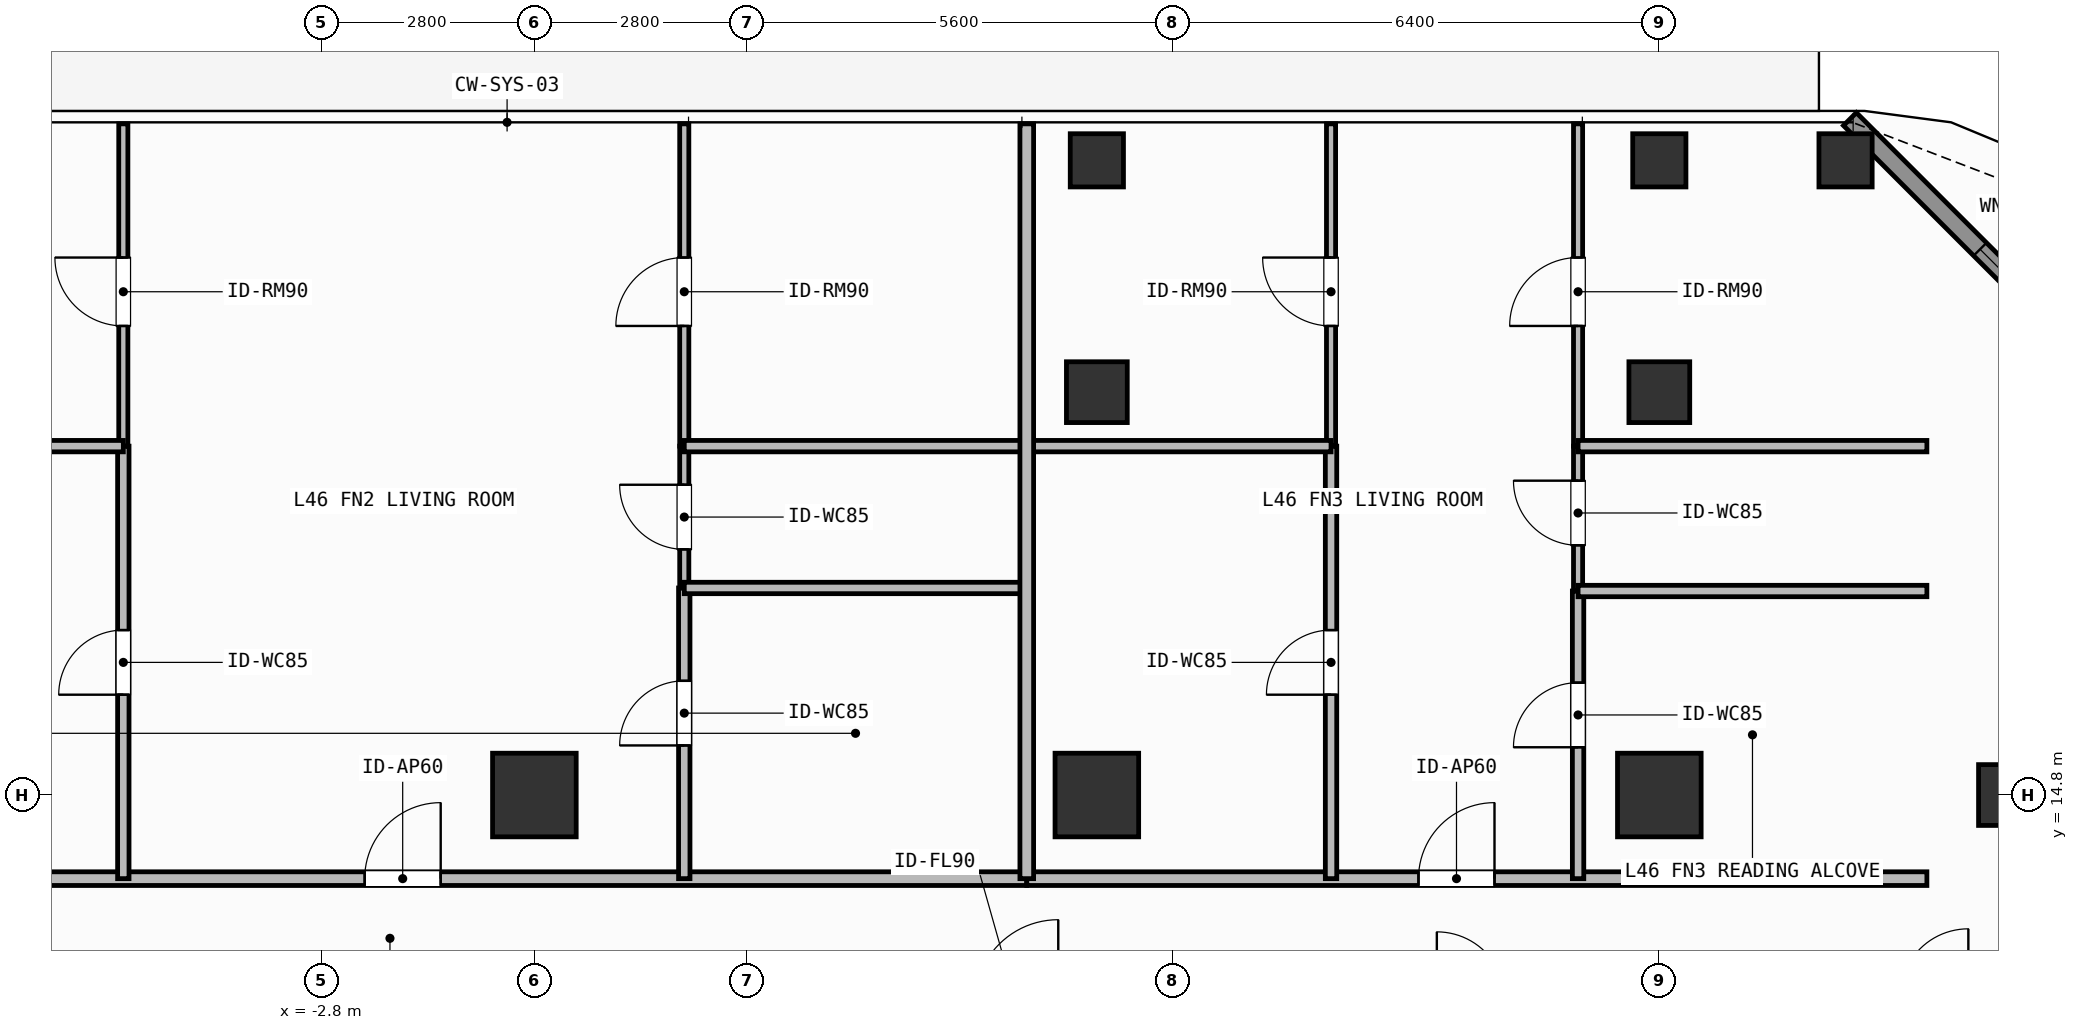
"""IFC4 building model, lengths in metres.
Left out: names, types, materials, properties, quantities, classifications, styles, units other than length and angle.
Written with IfcOpenShell. Run it as: python <this file> out.ifc"""

import sys

from ifc_helpers import new_model, si_unit, direction, frame, frame_2d, origin, origin_2d, place, context, subcontext, project, spatial, rectangle, hollow_rectangle, extrude, element, fill, save


model = new_model("IFC4")
c1 = context("Model", 3, precision=1e-05, world=origin(), true_north=direction((0.0, 1.0)))
c2 = subcontext(c1, "Body", "Model", "MODEL_VIEW")
j1 = project(units=[si_unit("LENGTHUNIT", "METRE"), si_unit("PLANEANGLEUNIT", "RADIAN")], contexts=[c1])
p1 = place(None, origin())
s1 = spatial("IfcSite", under=j1, at=p1, CompositionType="ELEMENT")
p2 = place(p1, origin())
s2 = spatial("IfcBuilding", under=s1, at=p2, CompositionType="ELEMENT")
p3 = place(p2, frame((0.0, 0.0, 187.5)))
s3 = spatial("IfcBuildingStorey", under=s2, at=p3, CompositionType="ELEMENT", Elevation=187.5)
for number, where, z_axis, x_axis in (
    (1, (0.0, 14.8, 0.0), (0.0, 0.0, 1.0), (1.0, 0.0, 0.0)),
    (2, (7.4, 14.8, 0.0), (0.0, 0.0, 1.0), (1.0, 0.0, 0.0)),
    (3, (14.8, 14.8, 0.0), (0.0, 0.0, 1.0), (1.0, 0.0, 0.0)),
):
    element("IfcColumn", number, at=place(p3, frame(where, z_axis=z_axis, x_axis=x_axis)), inside=s3, PredefinedType="COLUMN", context=c2, shape_type="SweptSolid", body=[
        extrude(rectangle(XDim=1.1, YDim=1.1, at=origin_2d()), origin(), (0.0, 0.0, 1.0), 3.9),
    ])
for number, where, z_axis, x_axis in (
    (4, (19.4, 14.8, 0.0), (0.0, 0.0, 1.0), (1.0, 0.0, 0.0)),
    (5, (7.4, 20.1, 0.0), (0.0, 0.0, 1.0), (1.0, 0.0, 0.0)),
    (6, (14.8, 20.1, 0.0), (0.0, 0.0, 1.0), (1.0, 0.0, 0.0)),
):
    element("IfcColumn", number, at=place(p3, frame(where, z_axis=z_axis, x_axis=x_axis)), inside=s3, PredefinedType="COLUMN", context=c2, shape_type="SweptSolid", body=[
        extrude(hollow_rectangle(XDim=0.8, YDim=0.8, WallThickness=0.036, at=origin_2d()), origin(), (0.0, 0.0, 1.0), 3.9),
    ])
for number, where, z_axis, x_axis in (
    (7, (17.25, 23.15, 0.0), (0.0, 0.0, 1.0), (1.0, 0.0, 0.0)),
    (8, (7.4, 23.15, 0.0), (0.0, 0.0, 1.0), (1.0, 0.0, 0.0)),
    (9, (14.8, 23.15, 0.0), (0.0, 0.0, 1.0), (1.0, 0.0, 0.0)),
):
    element("IfcColumn", number, at=place(p3, frame(where, z_axis=z_axis, x_axis=x_axis)), inside=s3, PredefinedType="COLUMN", context=c2, shape_type="SweptSolid", body=[
        extrude(hollow_rectangle(XDim=0.7, YDim=0.7, WallThickness=0.032, at=origin_2d()), origin(), (0.0, 0.0, 1.0), 3.9),
    ])
p4 = place(p3, frame((17.308, 23.692, 0.0), z_axis=(0.0, 0.0, 1.0), x_axis=(0.707106781187, -0.707106781187, 0.0)))
e10 = element("IfcWall", 10, at=p4, inside=s3, PredefinedType="SOLIDWALL", context=c2, shape_type="SweptSolid", body=[
    extrude(rectangle(XDim=6.343, YDim=0.24, at=frame_2d((3.171, 0.0))), origin(), (0.0, 0.0, 1.0), 3.62),
])
p5 = place(p4, frame((2.421, 0.0, 0.8)))
e11 = element("IfcOpeningElement", 11, at=p5, cuts=e10, PredefinedType="OPENING", context=c2, shape_type="SweptSolid", body=[
    extrude(rectangle(XDim=1.5, YDim=1.85, at=frame_2d((0.75, 0.925))), frame((0.0, 0.13, 0.0), z_axis=(0.0, -1.0, 0.0), x_axis=(1.0, 0.0, 0.0)), (0.0, 0.0, 1.0), 0.26),
])
p6 = place(p3, frame((-12.28, 13.7, 0.0), z_axis=(0.0, 0.0, 1.0), x_axis=(1.0, 0.0, 0.0)))
e12 = element("IfcWall", 12, at=p6, inside=s3, PredefinedType="PARTITIONING", context=c2, shape_type="SweptSolid", body=[
    extrude(rectangle(XDim=18.758, YDim=0.18, at=frame_2d((9.379, 0.0))), origin(), (0.0, 0.0, 1.0), 3.62),
])
p7 = place(p6, frame((10.048, 0.0, 0.0)))
e13 = element("IfcOpeningElement", 13, at=p7, cuts=e12, PredefinedType="OPENING", context=c2, shape_type="SweptSolid", body=[
    extrude(rectangle(XDim=1.0, YDim=2.2, at=frame_2d((0.5, 1.1))), frame((0.0, 0.1, 0.0), z_axis=(0.0, -1.0, 0.0), x_axis=(1.0, 0.0, 0.0)), (0.0, 0.0, 1.0), 0.2),
])
p8 = place(p3, frame((-5.408, 13.7, 0.0), z_axis=(0.0, 0.0, 1.0), x_axis=(0.0, 1.0, 0.0)))
e14 = element("IfcWall", 14, at=p8, inside=s3, PredefinedType="PARTITIONING", context=c2, shape_type="SweptSolid", body=[
    extrude(rectangle(XDim=5.69, YDim=0.15, at=frame_2d((2.845, 0.0))), origin(), (0.0, 0.0, 1.0), 3.62),
])
p9 = place(p8, frame((2.42, 0.0, 0.0)))
e15 = element("IfcOpeningElement", 15, at=p9, cuts=e14, PredefinedType="OPENING", context=c2, shape_type="SweptSolid", body=[
    extrude(rectangle(XDim=0.85, YDim=2.1, at=frame_2d((0.425, 1.05))), frame((0.0, 0.085, 0.0), z_axis=(0.0, -1.0, 0.0), x_axis=(1.0, 0.0, 0.0)), (0.0, 0.0, 1.0), 0.17),
])
p10 = place(p3, frame((-5.408, 19.39, 0.0), z_axis=(0.0, 0.0, 1.0), x_axis=(0.0, 1.0, 0.0)))
e16 = element("IfcWall", 16, at=p10, inside=s3, PredefinedType="PARTITIONING", context=c2, shape_type="SweptSolid", body=[
    extrude(rectangle(XDim=4.24, YDim=0.12, at=frame_2d((2.12, 0.0))), origin(), (0.0, 0.0, 1.0), 3.62),
])
p11 = place(p10, frame((1.581, 0.0, 0.0)))
e17 = element("IfcOpeningElement", 17, at=p11, cuts=e16, PredefinedType="OPENING", context=c2, shape_type="SweptSolid", body=[
    extrude(rectangle(XDim=0.9, YDim=2.1, at=frame_2d((0.45, 1.05))), frame((0.0, 0.07, 0.0), z_axis=(0.0, -1.0, 0.0), x_axis=(1.0, 0.0, 0.0)), (0.0, 0.0, 1.0), 0.14),
])
p12 = place(p3, frame((1.972, 13.7, 0.0), z_axis=(0.0, 0.0, 1.0), x_axis=(0.0, 1.0, 0.0)))
e18 = element("IfcWall", 18, at=p12, inside=s3, PredefinedType="PARTITIONING", context=c2, shape_type="SweptSolid", body=[
    extrude(rectangle(XDim=3.824, YDim=0.15, at=frame_2d((1.912, 0.0))), origin(), (0.0, 0.0, 1.0), 3.62),
])
p13 = place(p12, frame((1.752, 0.0, 0.0)))
e19 = element("IfcOpeningElement", 19, at=p13, cuts=e18, PredefinedType="OPENING", context=c2, shape_type="SweptSolid", body=[
    extrude(rectangle(XDim=0.85, YDim=2.1, at=frame_2d((0.425, 1.05))), frame((0.0, 0.085, 0.0), z_axis=(0.0, -1.0, 0.0), x_axis=(1.0, 0.0, 0.0)), (0.0, 0.0, 1.0), 0.17),
])
p14 = place(p3, frame((1.972, 17.524, 0.0), z_axis=(0.0, 0.0, 1.0), x_axis=(0.0, 1.0, 0.0)))
e20 = element("IfcWall", 20, at=p14, inside=s3, PredefinedType="PARTITIONING", context=c2, shape_type="SweptSolid", body=[
    extrude(rectangle(XDim=1.866, YDim=0.12, at=frame_2d((0.933, 0.0))), origin(), (0.0, 0.0, 1.0), 3.62),
])
p15 = place(p14, frame((0.508, 0.0, 0.0)))
e21 = element("IfcOpeningElement", 21, at=p15, cuts=e20, PredefinedType="OPENING", context=c2, shape_type="SweptSolid", body=[
    extrude(rectangle(XDim=0.85, YDim=2.1, at=frame_2d((0.425, 1.05))), frame((0.0, 0.07, 0.0), z_axis=(0.0, -1.0, 0.0), x_axis=(1.0, 0.0, 0.0)), (0.0, 0.0, 1.0), 0.14),
])
p16 = place(p3, frame((1.972, 19.39, 0.0), z_axis=(0.0, 0.0, 1.0), x_axis=(0.0, 1.0, 0.0)))
e22 = element("IfcWall", 22, at=p16, inside=s3, PredefinedType="PARTITIONING", context=c2, shape_type="SweptSolid", body=[
    extrude(rectangle(XDim=4.24, YDim=0.12, at=frame_2d((2.12, 0.0))), origin(), (0.0, 0.0, 1.0), 3.62),
])
p17 = place(p16, frame((1.581, 0.0, 0.0)))
e23 = element("IfcOpeningElement", 23, at=p17, cuts=e22, PredefinedType="OPENING", context=c2, shape_type="SweptSolid", body=[
    extrude(rectangle(XDim=0.9, YDim=2.1, at=frame_2d((0.45, 1.05))), frame((0.0, 0.07, 0.0), z_axis=(0.0, -1.0, 0.0), x_axis=(1.0, 0.0, 0.0)), (0.0, 0.0, 1.0), 0.14),
])
p18 = place(p3, frame((6.478, 13.7, 0.0), z_axis=(0.0, 0.0, 1.0), x_axis=(1.0, 0.0, 0.0)))
e24 = element("IfcWall", 24, at=p18, inside=s3, PredefinedType="PARTITIONING", context=c2, shape_type="SweptSolid", body=[
    extrude(rectangle(XDim=11.842, YDim=0.18, at=frame_2d((5.921, 0.0))), origin(), (0.0, 0.0, 1.0), 3.62),
])
p19 = place(p18, frame((5.154, 0.0, 0.0)))
e25 = element("IfcOpeningElement", 25, at=p19, cuts=e24, PredefinedType="OPENING", context=c2, shape_type="SweptSolid", body=[
    extrude(rectangle(XDim=1.0, YDim=2.2, at=frame_2d((0.5, 1.1))), frame((0.0, 0.1, 0.0), z_axis=(0.0, -1.0, 0.0), x_axis=(1.0, 0.0, 0.0)), (0.0, 0.0, 1.0), 0.2),
])
p20 = place(p3, frame((10.481, 13.7, 0.0), z_axis=(0.0, 0.0, 1.0), x_axis=(0.0, 1.0, 0.0)))
e26 = element("IfcWall", 26, at=p20, inside=s3, PredefinedType="PARTITIONING", context=c2, shape_type="SweptSolid", body=[
    extrude(rectangle(XDim=5.69, YDim=0.15, at=frame_2d((2.845, 0.0))), origin(), (0.0, 0.0, 1.0), 3.62),
])
p21 = place(p20, frame((2.42, 0.0, 0.0)))
e27 = element("IfcOpeningElement", 27, at=p21, cuts=e26, PredefinedType="OPENING", context=c2, shape_type="SweptSolid", body=[
    extrude(rectangle(XDim=0.85, YDim=2.1, at=frame_2d((0.425, 1.05))), frame((0.0, 0.085, 0.0), z_axis=(0.0, -1.0, 0.0), x_axis=(1.0, 0.0, 0.0)), (0.0, 0.0, 1.0), 0.17),
])
p22 = place(p3, frame((10.481, 19.39, 0.0), z_axis=(0.0, 0.0, 1.0), x_axis=(0.0, 1.0, 0.0)))
e28 = element("IfcWall", 28, at=p22, inside=s3, PredefinedType="PARTITIONING", context=c2, shape_type="SweptSolid", body=[
    extrude(rectangle(XDim=4.24, YDim=0.12, at=frame_2d((2.12, 0.0))), origin(), (0.0, 0.0, 1.0), 3.62),
])
p23 = place(p22, frame((1.581, 0.0, 0.0)))
e29 = element("IfcOpeningElement", 29, at=p23, cuts=e28, PredefinedType="OPENING", context=c2, shape_type="SweptSolid", body=[
    extrude(rectangle(XDim=0.9, YDim=2.1, at=frame_2d((0.45, 1.05))), frame((0.0, 0.07, 0.0), z_axis=(0.0, -1.0, 0.0), x_axis=(1.0, 0.0, 0.0)), (0.0, 0.0, 1.0), 0.14),
])
p24 = place(p3, frame((13.731, 13.7, 0.0), z_axis=(0.0, 0.0, 1.0), x_axis=(0.0, 1.0, 0.0)))
e30 = element("IfcWall", 30, at=p24, inside=s3, PredefinedType="PARTITIONING", context=c2, shape_type="SweptSolid", body=[
    extrude(rectangle(XDim=3.784, YDim=0.15, at=frame_2d((1.892, 0.0))), origin(), (0.0, 0.0, 1.0), 3.62),
])
p25 = place(p24, frame((1.729, 0.0, 0.0)))
e31 = element("IfcOpeningElement", 31, at=p25, cuts=e30, PredefinedType="OPENING", context=c2, shape_type="SweptSolid", body=[
    extrude(rectangle(XDim=0.85, YDim=2.1, at=frame_2d((0.425, 1.05))), frame((0.0, 0.085, 0.0), z_axis=(0.0, -1.0, 0.0), x_axis=(1.0, 0.0, 0.0)), (0.0, 0.0, 1.0), 0.17),
])
p26 = place(p3, frame((13.731, 17.484, 0.0), z_axis=(0.0, 0.0, 1.0), x_axis=(0.0, 1.0, 0.0)))
e32 = element("IfcWall", 32, at=p26, inside=s3, PredefinedType="PARTITIONING", context=c2, shape_type="SweptSolid", body=[
    extrude(rectangle(XDim=1.906, YDim=0.12, at=frame_2d((0.953, 0.0))), origin(), (0.0, 0.0, 1.0), 3.62),
])
p27 = place(p26, frame((0.602, 0.0, 0.0)))
e33 = element("IfcOpeningElement", 33, at=p27, cuts=e32, PredefinedType="OPENING", context=c2, shape_type="SweptSolid", body=[
    extrude(rectangle(XDim=0.85, YDim=2.1, at=frame_2d((0.425, 1.05))), frame((0.0, 0.07, 0.0), z_axis=(0.0, -1.0, 0.0), x_axis=(1.0, 0.0, 0.0)), (0.0, 0.0, 1.0), 0.14),
])
p28 = place(p3, frame((13.731, 19.39, 0.0), z_axis=(0.0, 0.0, 1.0), x_axis=(0.0, 1.0, 0.0)))
e34 = element("IfcWall", 34, at=p28, inside=s3, PredefinedType="PARTITIONING", context=c2, shape_type="SweptSolid", body=[
    extrude(rectangle(XDim=4.24, YDim=0.12, at=frame_2d((2.12, 0.0))), origin(), (0.0, 0.0, 1.0), 3.62),
])
p29 = place(p28, frame((1.581, 0.0, 0.0)))
e35 = element("IfcOpeningElement", 35, at=p29, cuts=e34, PredefinedType="OPENING", context=c2, shape_type="SweptSolid", body=[
    extrude(rectangle(XDim=0.9, YDim=2.1, at=frame_2d((0.45, 1.05))), frame((0.0, 0.07, 0.0), z_axis=(0.0, -1.0, 0.0), x_axis=(1.0, 0.0, 0.0)), (0.0, 0.0, 1.0), 0.14),
])
p30 = place(p3, frame((-12.28, 19.39, 0.0), z_axis=(0.0, 0.0, 1.0), x_axis=(1.0, 0.0, 0.0)))
e36 = element("IfcWall", 36, at=p30, inside=s3, PredefinedType="PARTITIONING", context=c2, shape_type="SweptSolid", body=[
    extrude(rectangle(XDim=6.872, YDim=0.15, at=frame_2d((3.436, 0.0))), origin(), (0.0, 0.0, 1.0), 3.62),
])
for number, where, z_axis, x_axis in (
    (37, (1.972, 17.524, 0.0), (0.0, 0.0, 1.0), (1.0, 0.0, 0.0)),
    (38, (1.972, 19.39, 0.0), (0.0, 0.0, 1.0), (1.0, 0.0, 0.0)),
):
    element("IfcWall", number, at=place(p3, frame(where, z_axis=z_axis, x_axis=x_axis)), inside=s3, PredefinedType="PARTITIONING", context=c2, shape_type="SweptSolid", body=[
        extrude(rectangle(XDim=4.506, YDim=0.15, at=frame_2d((2.253, 0.0))), origin(), (0.0, 0.0, 1.0), 3.62),
    ])
p31 = place(p3, frame((6.478, 19.39, 0.0), z_axis=(0.0, 0.0, 1.0), x_axis=(1.0, 0.0, 0.0)))
e39 = element("IfcWall", 39, at=p31, inside=s3, PredefinedType="PARTITIONING", context=c2, shape_type="SweptSolid", body=[
    extrude(rectangle(XDim=4.003, YDim=0.15, at=frame_2d((2.001, 0.0))), origin(), (0.0, 0.0, 1.0), 3.62),
])
for number, where, z_axis, x_axis in (
    (40, (13.731, 17.484, 0.0), (0.0, 0.0, 1.0), (1.0, 0.0, 0.0)),
    (41, (13.731, 19.39, 0.0), (0.0, 0.0, 1.0), (1.0, 0.0, 0.0)),
):
    element("IfcWall", number, at=place(p3, frame(where, z_axis=z_axis, x_axis=x_axis)), inside=s3, PredefinedType="PARTITIONING", context=c2, shape_type="SweptSolid", body=[
        extrude(rectangle(XDim=4.589, YDim=0.15, at=frame_2d((2.294, 0.0))), origin(), (0.0, 0.0, 1.0), 3.62),
    ])
p32 = place(p3, frame((6.478, 13.7, 0.0), z_axis=(0.0, 0.0, 1.0), x_axis=(0.0, 1.0, 0.0)))
e42 = element("IfcWall", 42, at=p32, inside=s3, PredefinedType="PARTITIONING", context=c2, shape_type="SweptSolid", body=[
    extrude(rectangle(XDim=9.93, YDim=0.18, at=frame_2d((4.965, 0.0))), origin(), (0.0, 0.0, 1.0), 3.62),
])
p33 = place(p5, origin())
e43 = element("IfcWindow", 43, at=p33, inside=s3, PartitioningType="SINGLE_PANEL", PredefinedType="WINDOW", context=c2, shape_type="SweptSolid", body=[
    extrude(rectangle(XDim=1.5, YDim=1.85, at=frame_2d((0.75, 0.925))), frame((0.0, 0.03, 0.0), z_axis=(0.0, -1.0, 0.0), x_axis=(1.0, 0.0, 0.0)), (0.0, 0.0, 1.0), 0.06),
])
fill(e11, e43)
p34 = place(p7, origin())
e44 = element("IfcDoor", 44, at=p34, inside=s3, OperationType="SINGLE_SWING_RIGHT", PredefinedType="DOOR", context=c2, shape_type="SweptSolid", body=[
    extrude(rectangle(XDim=1.0, YDim=2.2, at=frame_2d((0.5, 1.1))), frame((0.0, 0.025, 0.0), z_axis=(0.0, -1.0, 0.0), x_axis=(1.0, 0.0, 0.0)), (0.0, 0.0, 1.0), 0.05),
])
fill(e13, e44)
p35 = place(p9, origin())
e45 = element("IfcDoor", 45, at=p35, inside=s3, OperationType="SINGLE_SWING_LEFT", PredefinedType="DOOR", context=c2, shape_type="SweptSolid", body=[
    extrude(rectangle(XDim=0.85, YDim=2.1, at=frame_2d((0.425, 1.05))), frame((0.0, 0.025, 0.0), z_axis=(0.0, -1.0, 0.0), x_axis=(1.0, 0.0, 0.0)), (0.0, 0.0, 1.0), 0.05),
])
fill(e15, e45)
p36 = place(p11, origin())
e46 = element("IfcDoor", 46, at=p36, inside=s3, OperationType="SINGLE_SWING_RIGHT", PredefinedType="DOOR", context=c2, shape_type="SweptSolid", body=[
    extrude(rectangle(XDim=0.9, YDim=2.1, at=frame_2d((0.45, 1.05))), frame((0.0, 0.025, 0.0), z_axis=(0.0, -1.0, 0.0), x_axis=(1.0, 0.0, 0.0)), (0.0, 0.0, 1.0), 0.05),
])
fill(e17, e46)
p37 = place(p13, origin())
e47 = element("IfcDoor", 47, at=p37, inside=s3, OperationType="SINGLE_SWING_LEFT", PredefinedType="DOOR", context=c2, shape_type="SweptSolid", body=[
    extrude(rectangle(XDim=0.85, YDim=2.1, at=frame_2d((0.425, 1.05))), frame((0.0, 0.025, 0.0), z_axis=(0.0, -1.0, 0.0), x_axis=(1.0, 0.0, 0.0)), (0.0, 0.0, 1.0), 0.05),
])
fill(e19, e47)
p38 = place(p15, origin())
e48 = element("IfcDoor", 48, at=p38, inside=s3, OperationType="SINGLE_SWING_RIGHT", PredefinedType="DOOR", context=c2, shape_type="SweptSolid", body=[
    extrude(rectangle(XDim=0.85, YDim=2.1, at=frame_2d((0.425, 1.05))), frame((0.0, 0.025, 0.0), z_axis=(0.0, -1.0, 0.0), x_axis=(1.0, 0.0, 0.0)), (0.0, 0.0, 1.0), 0.05),
])
fill(e21, e48)
p39 = place(p17, origin())
e49 = element("IfcDoor", 49, at=p39, inside=s3, OperationType="SINGLE_SWING_LEFT", PredefinedType="DOOR", context=c2, shape_type="SweptSolid", body=[
    extrude(rectangle(XDim=0.9, YDim=2.1, at=frame_2d((0.45, 1.05))), frame((0.0, 0.025, 0.0), z_axis=(0.0, -1.0, 0.0), x_axis=(1.0, 0.0, 0.0)), (0.0, 0.0, 1.0), 0.05),
])
fill(e23, e49)
p40 = place(p19, origin())
e50 = element("IfcDoor", 50, at=p40, inside=s3, OperationType="SINGLE_SWING_RIGHT", PredefinedType="DOOR", context=c2, shape_type="SweptSolid", body=[
    extrude(rectangle(XDim=1.0, YDim=2.2, at=frame_2d((0.5, 1.1))), frame((0.0, 0.025, 0.0), z_axis=(0.0, -1.0, 0.0), x_axis=(1.0, 0.0, 0.0)), (0.0, 0.0, 1.0), 0.05),
])
fill(e25, e50)
p41 = place(p21, origin())
e51 = element("IfcDoor", 51, at=p41, inside=s3, OperationType="SINGLE_SWING_LEFT", PredefinedType="DOOR", context=c2, shape_type="SweptSolid", body=[
    extrude(rectangle(XDim=0.85, YDim=2.1, at=frame_2d((0.425, 1.05))), frame((0.0, 0.025, 0.0), z_axis=(0.0, -1.0, 0.0), x_axis=(1.0, 0.0, 0.0)), (0.0, 0.0, 1.0), 0.05),
])
fill(e27, e51)
p42 = place(p23, origin())
e52 = element("IfcDoor", 52, at=p42, inside=s3, OperationType="SINGLE_SWING_RIGHT", PredefinedType="DOOR", context=c2, shape_type="SweptSolid", body=[
    extrude(rectangle(XDim=0.9, YDim=2.1, at=frame_2d((0.45, 1.05))), frame((0.0, 0.025, 0.0), z_axis=(0.0, -1.0, 0.0), x_axis=(1.0, 0.0, 0.0)), (0.0, 0.0, 1.0), 0.05),
])
fill(e29, e52)
p43 = place(p25, origin())
e53 = element("IfcDoor", 53, at=p43, inside=s3, OperationType="SINGLE_SWING_LEFT", PredefinedType="DOOR", context=c2, shape_type="SweptSolid", body=[
    extrude(rectangle(XDim=0.85, YDim=2.1, at=frame_2d((0.425, 1.05))), frame((0.0, 0.025, 0.0), z_axis=(0.0, -1.0, 0.0), x_axis=(1.0, 0.0, 0.0)), (0.0, 0.0, 1.0), 0.05),
])
fill(e31, e53)
p44 = place(p27, origin())
e54 = element("IfcDoor", 54, at=p44, inside=s3, OperationType="SINGLE_SWING_RIGHT", PredefinedType="DOOR", context=c2, shape_type="SweptSolid", body=[
    extrude(rectangle(XDim=0.85, YDim=2.1, at=frame_2d((0.425, 1.05))), frame((0.0, 0.025, 0.0), z_axis=(0.0, -1.0, 0.0), x_axis=(1.0, 0.0, 0.0)), (0.0, 0.0, 1.0), 0.05),
])
fill(e33, e54)
p45 = place(p29, origin())
e55 = element("IfcDoor", 55, at=p45, inside=s3, OperationType="SINGLE_SWING_LEFT", PredefinedType="DOOR", context=c2, shape_type="SweptSolid", body=[
    extrude(rectangle(XDim=0.9, YDim=2.1, at=frame_2d((0.45, 1.05))), frame((0.0, 0.025, 0.0), z_axis=(0.0, -1.0, 0.0), x_axis=(1.0, 0.0, 0.0)), (0.0, 0.0, 1.0), 0.05),
])
fill(e35, e55)
save(model, sys.argv[1])
